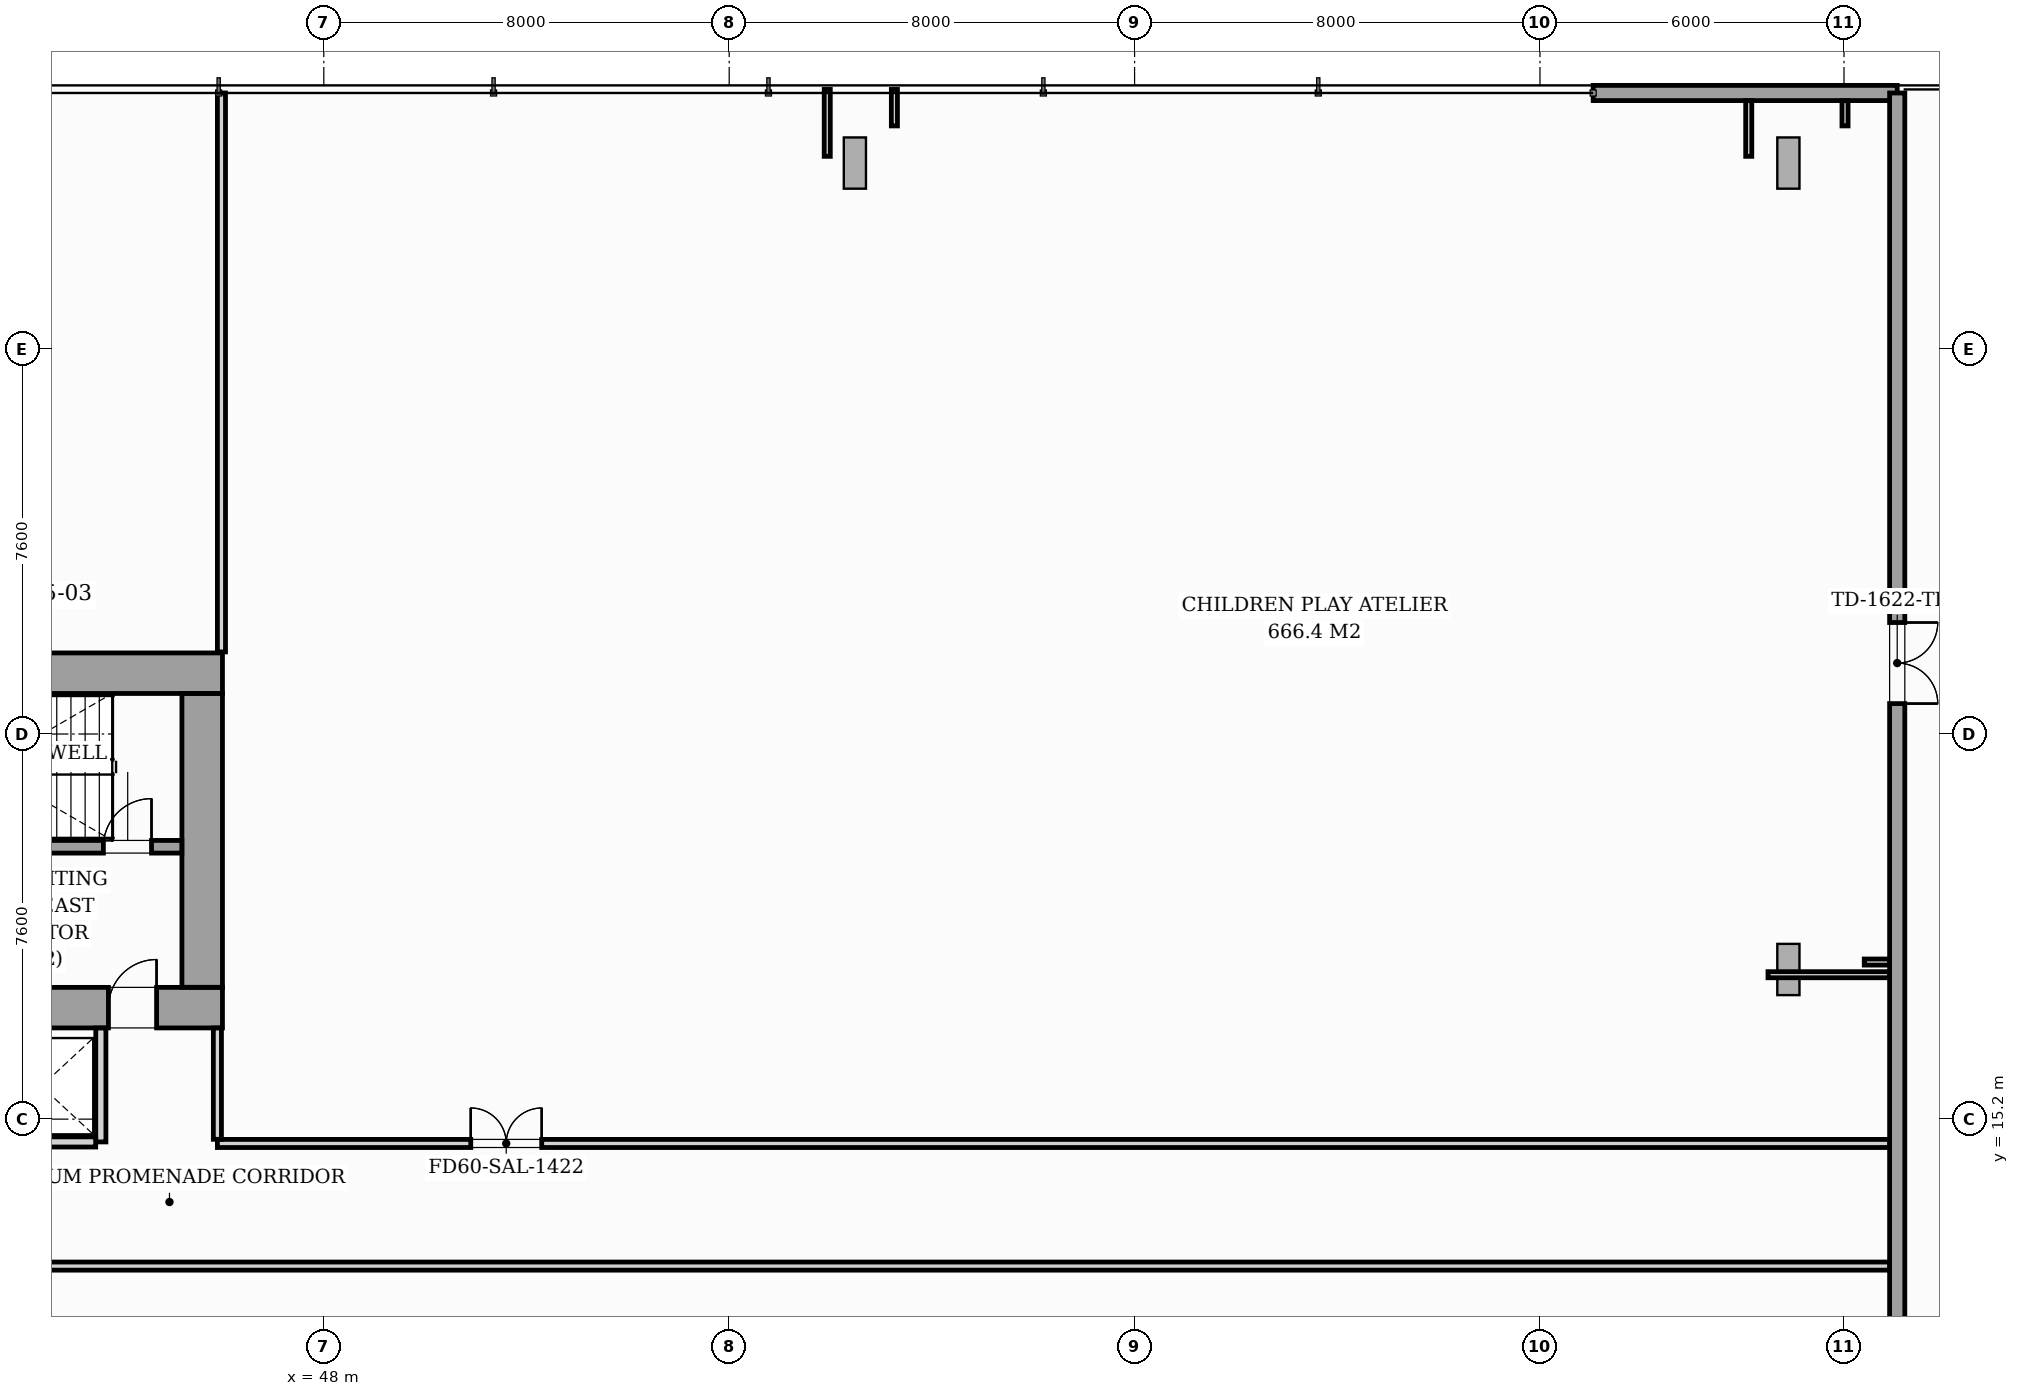
"""IFC4 building model, lengths in metres.
Left out: names, types, materials, properties, quantities, classifications, styles, units other than length and angle.
Written with IfcOpenShell. Run it as: python <this file> out.ifc"""

import sys

from ifc_helpers import new_model, si_unit, direction, frame, frame_2d, origin, origin_2d, place, context, subcontext, project, spatial, rectangle, i_section, extrude, source, transform, mapped, element, fill, save


model = new_model("IFC4")
c1 = context("Model", 3, precision=1e-05, world=origin(), true_north=direction((0.0, 1.0)))
c2 = subcontext(c1, "Body", "Model", "MODEL_VIEW")
j1 = project(units=[si_unit("LENGTHUNIT", "METRE"), si_unit("PLANEANGLEUNIT", "RADIAN")], contexts=[c1])
p1 = place(None, origin())
s1 = spatial("IfcSite", under=j1, at=p1, CompositionType="ELEMENT")
p2 = place(p1, origin())
s2 = spatial("IfcBuilding", under=s1, at=p2, CompositionType="ELEMENT")
p3 = place(p2, frame((0.0, 0.0, 5.0)))
s3 = spatial("IfcBuildingStorey", under=s2, at=p3, CompositionType="ELEMENT", Elevation=5.0)
m1 = source(origin(), c2, "Body", "SweptSolid", [
    extrude(i_section(OverallWidth=0.437, OverallDepth=0.514, WebThickness=0.061, FlangeThickness=0.097, FilletRadius=0.018, at=origin_2d()), origin(), (0.0, 0.0, 1.0), 4.496),
])
for number, where, z_axis, x_axis in (
    (1, (45.6, 17.4, 0.002), (0.0, 0.0, 1.0), (1.0, 0.0, 0.0)),
    (2, (45.6, 24.0, 0.002), (0.0, 0.0, 1.0), (1.0, 0.0, 0.0)),
):
    element("IfcColumn", number, at=place(p3, frame(where, z_axis=z_axis, x_axis=x_axis)), inside=s3, PredefinedType="PILASTER", context=c2, shape_type="MappedRepresentation", body=[
        mapped(m1, transform((0.0, 0.0, 0.0), scale=1.0)),
    ])
m2 = source(origin(), c2, "Body", "SweptSolid", [
    extrude(i_section(OverallWidth=0.438, OverallDepth=1.011, WebThickness=0.041, FlangeThickness=0.074, FilletRadius=0.024, at=origin_2d()), origin(), (0.0, 0.0, 1.0), 4.669),
])
p4 = place(p3, frame((59.17, 34.379, 0.139), z_axis=(-0.528858288153, -0.239463268387, 0.814227397074), x_axis=(0.741734249024, 0.335851988189, 0.580546075566)))
e3 = element("IfcColumn", 3, at=p4, inside=s3, PredefinedType="COLUMN", context=c2, shape_type="MappedRepresentation", body=[
    mapped(m2, transform((0.0, 0.0, 0.0), scale=1.0)),
])
m3 = source(origin(), c2, "Body", "SweptSolid", [
    extrude(i_section(OverallWidth=0.438, OverallDepth=1.011, WebThickness=0.041, FlangeThickness=0.074, FilletRadius=0.024, at=origin_2d()), origin(), (0.0, 0.0, 1.0), 5.242),
])
p5 = place(p3, frame((77.866, 34.372, 0.165), z_axis=(-0.666275773327, -0.210402875787, 0.715407033609), x_axis=(0.682199745765, 0.215431498663, 0.698707933447)))
e4 = element("IfcColumn", 4, at=p5, inside=s3, PredefinedType="COLUMN", context=c2, shape_type="MappedRepresentation", body=[
    mapped(m3, transform((0.0, 0.0, 0.0), scale=1.0)),
])
m4 = source(origin(), c2, "Body", "SweptSolid", [
    extrude(i_section(OverallWidth=0.438, OverallDepth=1.011, WebThickness=0.041, FlangeThickness=0.074, FilletRadius=0.024, at=origin_2d()), origin(), (0.0, 0.0, 1.0), 5.154),
])
p6 = place(p3, frame((77.869, 18.28, 0.162), z_axis=(-0.678825179895, -0.089335307325, 0.72884537318), x_axis=(0.722614644712, 0.095098124341, 0.68467833469)))
e5 = element("IfcColumn", 5, at=p6, inside=s3, PredefinedType="COLUMN", context=c2, shape_type="MappedRepresentation", body=[
    mapped(m4, transform((0.0, 0.0, 0.0), scale=1.0)),
])
p7 = place(p3, frame((73.05, 35.45, 0.0), z_axis=(0.0, 0.0, 1.0), x_axis=(1.0, 0.0, 0.0)))
e6 = element("IfcWall", 6, at=p7, inside=s3, PredefinedType="STANDARD", context=c2, shape_type="SweptSolid", body=[
    extrude(rectangle(XDim=6.0, YDim=0.3, at=frame_2d((3.0, 0.0))), origin(), (0.0, 0.0, 1.0), 4.08),
])
p8 = place(p3, frame((79.05, 35.45, 0.0), z_axis=(0.0, 0.0, 1.0), x_axis=(0.0, -1.0, 0.0)))
e7 = element("IfcWall", 7, at=p8, inside=s3, PredefinedType="STANDARD", context=c2, shape_type="SweptSolid", body=[
    extrude(rectangle(XDim=34.3, YDim=0.3, at=frame_2d((17.15, 0.0))), origin(), (0.0, 0.0, 1.0), 4.08),
])
p9 = place(p8, frame((10.45, 0.0, 0.0)))
e8 = element("IfcOpeningElement", 8, at=p9, cuts=e7, PredefinedType="OPENING", context=c2, shape_type="SweptSolid", body=[
    extrude(rectangle(XDim=1.6, YDim=2.1, at=frame_2d((0.8, 1.05))), frame((0.0, 0.16, 0.0), z_axis=(0.0, -1.0, 0.0), x_axis=(1.0, 0.0, 0.0)), (0.0, 0.0, 1.0), 0.32),
])
p10 = place(p8, frame((28.25, 0.0, 0.9)))
e9 = element("IfcOpeningElement", 9, at=p10, cuts=e7, PredefinedType="OPENING", context=c2, shape_type="SweptSolid", body=[
    extrude(rectangle(XDim=2.0, YDim=2.4, at=frame_2d((1.0, 1.2))), frame((0.0, 0.16, 0.0), z_axis=(0.0, -1.0, 0.0), x_axis=(1.0, 0.0, 0.0)), (0.0, 0.0, 1.0), 0.32),
])
p11 = place(p3, frame((26.0, 17.4, 0.0), z_axis=(0.0, 0.0, 1.0), x_axis=(1.0, 0.0, 0.0)))
e10 = element("IfcWall", 10, at=p11, inside=s3, PredefinedType="SHEAR", context=c2, shape_type="SweptSolid", body=[
    extrude(rectangle(XDim=20.0, YDim=0.8, at=frame_2d((10.0, 0.0))), origin(), (0.0, 0.0, 1.0), 4.5),
])
p12 = place(p11, frame((1.15, 0.0, 0.0)))
e11 = element("IfcOpeningElement", 11, at=p12, cuts=e10, PredefinedType="OPENING", context=c2, shape_type="SweptSolid", body=[
    extrude(rectangle(XDim=0.95, YDim=2.06, at=frame_2d((0.475, 1.03))), frame((0.0, 0.41, 0.0), z_axis=(0.0, -1.0, 0.0), x_axis=(1.0, 0.0, 0.0)), (0.0, 0.0, 1.0), 0.82),
])
p13 = place(p11, frame((9.58, 0.0, 0.0)))
e12 = element("IfcOpeningElement", 12, at=p13, cuts=e10, PredefinedType="OPENING", context=c2, shape_type="SweptSolid", body=[
    extrude(rectangle(XDim=0.9, YDim=2.06, at=frame_2d((0.45, 1.03))), frame((0.0, 0.41, 0.0), z_axis=(0.0, -1.0, 0.0), x_axis=(1.0, 0.0, 0.0)), (0.0, 0.0, 1.0), 0.82),
])
p14 = place(p11, frame((17.75, 0.0, 0.0)))
e13 = element("IfcOpeningElement", 13, at=p14, cuts=e10, PredefinedType="OPENING", context=c2, shape_type="SweptSolid", body=[
    extrude(rectangle(XDim=0.95, YDim=2.06, at=frame_2d((0.475, 1.03))), frame((0.0, 0.41, 0.0), z_axis=(0.0, -1.0, 0.0), x_axis=(1.0, 0.0, 0.0)), (0.0, 0.0, 1.0), 0.82),
])
p15 = place(p3, frame((26.0, 24.0, 0.0), z_axis=(0.0, 0.0, 1.0), x_axis=(1.0, 0.0, 0.0)))
e14 = element("IfcWall", 14, at=p15, inside=s3, PredefinedType="SHEAR", context=c2, shape_type="SweptSolid", body=[
    extrude(rectangle(XDim=20.0, YDim=0.8, at=frame_2d((10.0, 0.0))), origin(), (0.0, 0.0, 1.0), 4.5),
])
p16 = place(p3, frame((45.6, 17.802, 0.0), z_axis=(0.0, 0.0, 1.0), x_axis=(0.0, 1.0, 0.0)))
e15 = element("IfcWall", 15, at=p16, inside=s3, PredefinedType="SHEAR", context=c2, shape_type="SweptSolid", body=[
    extrude(rectangle(XDim=5.796, YDim=0.8, at=frame_2d((2.898, 0.0))), origin(), (0.0, 0.0, 1.0), 4.5),
])
p17 = place(p3, frame((37.05, 20.575, 0.0), z_axis=(0.0, 0.0, 1.0), x_axis=(1.0, 0.0, 0.0)))
e16 = element("IfcWall", 16, at=p17, inside=s3, PredefinedType="SOLIDWALL", context=c2, shape_type="SweptSolid", body=[
    extrude(rectangle(XDim=8.148, YDim=0.25, at=frame_2d((4.074, 0.0))), origin(), (0.0, 0.0, 1.0), 4.5),
])
p18 = place(p17, frame((6.6, 0.0, 0.0)))
e17 = element("IfcOpeningElement", 17, at=p18, cuts=e16, PredefinedType="OPENING", context=c2, shape_type="SweptSolid", body=[
    extrude(rectangle(XDim=0.95, YDim=2.06, at=frame_2d((0.475, 1.03))), frame((0.0, 0.135, 0.0), z_axis=(0.0, -1.0, 0.0), x_axis=(1.0, 0.0, 0.0)), (0.0, 0.0, 1.0), 0.27),
])
p19 = place(p3, frame((43.6, 14.75, 0.0), z_axis=(0.0, 0.0, 1.0), x_axis=(0.0, 1.0, 0.0)))
e18 = element("IfcWall", 18, at=p19, inside=s3, PredefinedType="PARTITIONING", context=c2, shape_type="SweptSolid", body=[
    extrude(rectangle(XDim=2.248, YDim=0.2, at=frame_2d((1.124, 0.0))), origin(), (0.0, 0.0, 1.0), 4.08),
])
p20 = place(p3, frame((41.352, 14.75, 0.0), z_axis=(0.0, 0.0, 1.0), x_axis=(1.0, 0.0, 0.0)))
e19 = element("IfcWall", 19, at=p20, inside=s3, PredefinedType="PARTITIONING", context=c2, shape_type="SweptSolid", body=[
    extrude(rectangle(XDim=2.146, YDim=0.2, at=frame_2d((1.073, 0.0))), origin(), (0.0, 0.0, 1.0), 4.08),
])
p21 = place(p3, frame((1.95, 12.3, 0.0), z_axis=(0.0, 0.0, 1.0), x_axis=(1.0, 0.0, 0.0)))
e20 = element("IfcWall", 20, at=p21, inside=s3, PredefinedType="PARTITIONING", context=c2, shape_type="SweptSolid", body=[
    extrude(rectangle(XDim=76.948, YDim=0.16, at=frame_2d((38.474, 0.0))), origin(), (0.0, 0.0, 1.0), 4.08),
])
p22 = place(p21, frame((6.5, 0.0, 0.0)))
e21 = element("IfcOpeningElement", 21, at=p22, cuts=e20, PredefinedType="OPENING", context=c2, shape_type="SweptSolid", body=[
    extrude(rectangle(XDim=1.4, YDim=2.08, at=frame_2d((0.7, 1.04))), frame((0.0, 0.09, 0.0), z_axis=(0.0, -1.0, 0.0), x_axis=(1.0, 0.0, 0.0)), (0.0, 0.0, 1.0), 0.18),
])
p23 = place(p21, frame((28.0, 0.0, 0.0)))
e22 = element("IfcOpeningElement", 22, at=p23, cuts=e20, PredefinedType="OPENING", context=c2, shape_type="SweptSolid", body=[
    extrude(rectangle(XDim=1.4, YDim=2.08, at=frame_2d((0.7, 1.04))), frame((0.0, 0.09, 0.0), z_axis=(0.0, -1.0, 0.0), x_axis=(1.0, 0.0, 0.0)), (0.0, 0.0, 1.0), 0.18),
])
p24 = place(p3, frame((45.9, 14.72, 0.0), z_axis=(0.0, 0.0, 1.0), x_axis=(1.0, 0.0, 0.0)))
e23 = element("IfcWall", 23, at=p24, inside=s3, PredefinedType="PARTITIONING", context=c2, shape_type="SweptSolid", body=[
    extrude(rectangle(XDim=32.998, YDim=0.16, at=frame_2d((16.499, 0.0))), origin(), (0.0, 0.0, 1.0), 4.08),
])
p25 = place(p24, frame((5.0, 0.0, 0.0)))
e24 = element("IfcOpeningElement", 24, at=p25, cuts=e23, PredefinedType="OPENING", context=c2, shape_type="SweptSolid", body=[
    extrude(rectangle(XDim=1.4, YDim=2.08, at=frame_2d((0.7, 1.04))), frame((0.0, 0.09, 0.0), z_axis=(0.0, -1.0, 0.0), x_axis=(1.0, 0.0, 0.0)), (0.0, 0.0, 1.0), 0.18),
])
p26 = place(p3, frame((45.98, 24.42, 0.0), z_axis=(0.0, 0.0, 1.0), x_axis=(0.0, 1.0, 0.0)))
e25 = element("IfcWall", 25, at=p26, inside=s3, PredefinedType="PARTITIONING", context=c2, shape_type="SweptSolid", body=[
    extrude(rectangle(XDim=11.03, YDim=0.16, at=frame_2d((5.515, 0.0))), origin(), (0.0, 0.0, 1.0), 4.08),
])
p27 = place(p3, frame((45.9, 14.802, 0.0), z_axis=(0.0, 0.0, 1.0), x_axis=(0.0, 1.0, 0.0)))
e26 = element("IfcWall", 26, at=p27, inside=s3, PredefinedType="PARTITIONING", context=c2, shape_type="SweptSolid", body=[
    extrude(rectangle(XDim=2.196, YDim=0.16, at=frame_2d((1.098, 0.0))), origin(), (0.0, 0.0, 1.0), 4.08),
])
p28 = place(p3, frame((57.935, 34.2, 0.0), z_axis=(0.0, 0.0, 1.0), x_axis=(0.0, 1.0, 0.0)))
e27 = element("IfcWall", 27, at=p28, inside=s3, PredefinedType="PARTITIONING", context=c2, shape_type="SweptSolid", body=[
    extrude(rectangle(XDim=1.32, YDim=0.12, at=frame_2d((0.66, 0.0))), origin(), (0.0, 0.0, 1.0), 4.08),
])
p29 = place(p3, frame((76.12, 34.2, 0.0), z_axis=(0.0, 0.0, 1.0), x_axis=(0.0, 1.0, 0.0)))
e28 = element("IfcWall", 28, at=p29, inside=s3, PredefinedType="PARTITIONING", context=c2, shape_type="SweptSolid", body=[
    extrude(rectangle(XDim=1.098, YDim=0.12, at=frame_2d((0.549, 0.0))), origin(), (0.0, 0.0, 1.0), 4.08),
])
p30 = place(p3, frame((76.5, 18.05, 0.0), z_axis=(0.0, 0.0, 1.0), x_axis=(1.0, 0.0, 0.0)))
e29 = element("IfcWall", 29, at=p30, inside=s3, PredefinedType="PARTITIONING", context=c2, shape_type="SweptSolid", body=[
    extrude(rectangle(XDim=2.398, YDim=0.12, at=frame_2d((1.199, 0.0))), origin(), (0.0, 0.0, 1.0), 4.08),
])
p31 = place(p3, frame((59.26, 34.8, 0.0), z_axis=(0.0, 0.0, 1.0), x_axis=(0.0, 1.0, 0.0)))
e30 = element("IfcWall", 30, at=p31, inside=s3, PredefinedType="PARTITIONING", context=c2, shape_type="SweptSolid", body=[
    extrude(rectangle(XDim=0.72, YDim=0.12, at=frame_2d((0.36, 0.0))), origin(), (0.0, 0.0, 1.0), 4.08),
])
for number, where, z_axis, x_axis in (
    (31, (78.02, 34.8, 0.0), (0.0, 0.0, 1.0), (0.0, 1.0, 0.0)),
    (32, (78.4, 18.3, 0.0), (0.0, 0.0, 1.0), (1.0, 0.0, 0.0)),
):
    element("IfcWall", number, at=place(p3, frame(where, z_axis=z_axis, x_axis=x_axis)), inside=s3, PredefinedType="PARTITIONING", context=c2, shape_type="SweptSolid", body=[
        extrude(rectangle(XDim=0.498, YDim=0.12, at=frame_2d((0.249, 0.0))), origin(), (0.0, 0.0, 1.0), 4.08),
    ])
m5 = source(origin(), c2, "Body", "SweptSolid", [
    extrude(rectangle(XDim=1.6, YDim=2.1, at=frame_2d((0.8, 1.05))), frame((0.0, 0.025, 0.0), z_axis=(0.0, -1.0, 0.0), x_axis=(1.0, 0.0, 0.0)), (0.0, 0.0, 1.0), 0.05),
])
p32 = place(p9, origin())
e33 = element("IfcDoor", 33, at=p32, inside=s3, OperationType="DOUBLE_DOOR_SINGLE_SWING", PredefinedType="DOOR", context=c2, shape_type="MappedRepresentation", body=[
    mapped(m5, transform((0.0, 0.0, 0.0), scale=1.0)),
])
fill(e8, e33)
m6 = source(origin(), c2, "Body", "SweptSolid", [
    extrude(rectangle(XDim=0.95, YDim=2.06, at=frame_2d((0.475, 1.03))), frame((0.0, 0.025, 0.0), z_axis=(0.0, -1.0, 0.0), x_axis=(1.0, 0.0, 0.0)), (0.0, 0.0, 1.0), 0.05),
])
p33 = place(p14, origin())
e34 = element("IfcDoor", 34, at=p33, inside=s3, OperationType="SINGLE_SWING_RIGHT", PredefinedType="DOOR", context=c2, shape_type="MappedRepresentation", body=[
    mapped(m6, transform((0.0, 0.0, 0.0), scale=1.0)),
])
fill(e13, e34)
p34 = place(p18, origin())
e35 = element("IfcDoor", 35, at=p34, inside=s3, OperationType="SINGLE_SWING_RIGHT", PredefinedType="DOOR", context=c2, shape_type="MappedRepresentation", body=[
    mapped(m6, transform((0.0, 0.0, 0.0), scale=1.0)),
])
fill(e17, e35)
m7 = source(origin(), c2, "Body", "SweptSolid", [
    extrude(rectangle(XDim=1.4, YDim=2.08, at=frame_2d((0.7, 1.04))), frame((0.0, 0.025, 0.0), z_axis=(0.0, -1.0, 0.0), x_axis=(1.0, 0.0, 0.0)), (0.0, 0.0, 1.0), 0.05),
])
p35 = place(p25, origin())
e36 = element("IfcDoor", 36, at=p35, inside=s3, OperationType="DOUBLE_DOOR_SINGLE_SWING", PredefinedType="DOOR", context=c2, shape_type="MappedRepresentation", body=[
    mapped(m7, transform((0.0, 0.0, 0.0), scale=1.0)),
])
fill(e24, e36)
save(model, sys.argv[1])
